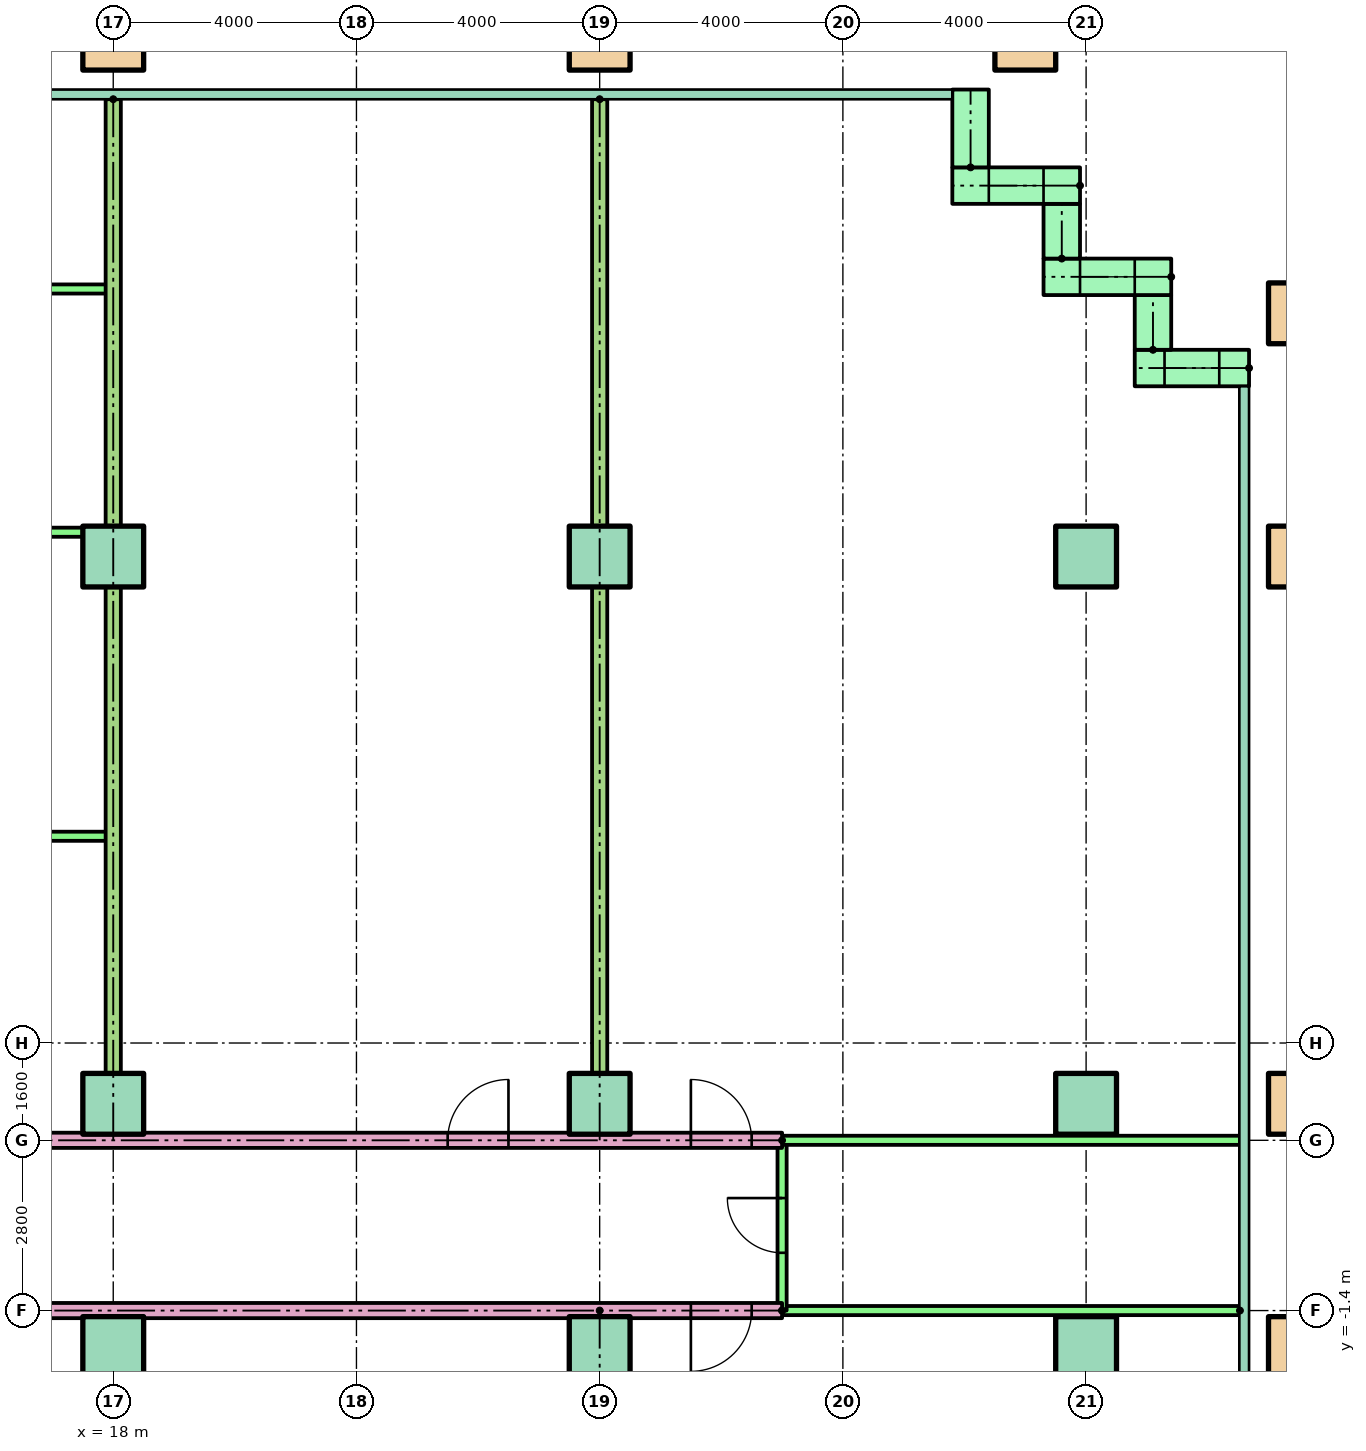
"""IFC4 building model, lengths in metres.
Left out: names, types, materials, properties, quantities, classifications, styles, units other than length and angle.
Written with IfcOpenShell. Run it as: python <this file> out.ifc"""

import sys

from ifc_helpers import new_model, si_unit, direction, frame, frame_2d, origin, origin_2d, place, context, subcontext, project, spatial, rectangle, hollow_rectangle, extrude, element, fill, save


model = new_model("IFC4")
c1 = context("Model", 3, precision=1e-05, world=origin(), true_north=direction((0.0, 1.0)))
c2 = subcontext(c1, "Body", "Model", "MODEL_VIEW")
j1 = project(units=[si_unit("LENGTHUNIT", "METRE"), si_unit("PLANEANGLEUNIT", "RADIAN")], contexts=[c1])
p1 = place(None, origin())
s1 = spatial("IfcSite", under=j1, at=p1, CompositionType="ELEMENT")
p2 = place(p1, origin())
s2 = spatial("IfcBuilding", under=s1, at=p2, CompositionType="ELEMENT")
p3 = place(p2, frame((0.0, 0.0, 37.7)))
s3 = spatial("IfcBuildingStorey", under=s2, at=p3, CompositionType="ELEMENT", Elevation=37.7)
for number, where in (
    (1, (18.0, -2.0, 0.0)),
    (2, (26.0, -2.0, 0.0)),
    (3, (34.0, -2.0, 0.0)),
):
    element("IfcColumn", number, at=place(p3, frame(where)), inside=s3, PredefinedType="COLUMN", context=c2, shape_type="SweptSolid", body=[
        extrude(rectangle(XDim=1.0, YDim=1.0, at=origin_2d()), origin(), (0.0, 0.0, 1.0), 3.9),
    ])
p4 = place(p3, frame((37.5, -2.0, 0.0)))
e4 = element("IfcColumn", 4, at=p4, inside=s3, PredefinedType="COLUMN", context=c2, shape_type="SweptSolid", body=[
    extrude(hollow_rectangle(XDim=1.0, YDim=1.0, WallThickness=0.05, at=origin_2d()), origin(), (0.0, 0.0, 1.0), 3.9),
])
for number, where in (
    (5, (18.0, 2.0, 0.0)),
    (6, (26.0, 2.0, 0.0)),
    (7, (34.0, 2.0, 0.0)),
):
    element("IfcColumn", number, at=place(p3, frame(where)), inside=s3, PredefinedType="COLUMN", context=c2, shape_type="SweptSolid", body=[
        extrude(rectangle(XDim=1.0, YDim=1.0, at=origin_2d()), origin(), (0.0, 0.0, 1.0), 3.9),
    ])
p5 = place(p3, frame((37.5, 2.0, 0.0)))
e8 = element("IfcColumn", 8, at=p5, inside=s3, PredefinedType="COLUMN", context=c2, shape_type="SweptSolid", body=[
    extrude(hollow_rectangle(XDim=1.0, YDim=1.0, WallThickness=0.05, at=origin_2d()), origin(), (0.0, 0.0, 1.0), 3.9),
])
for number, where in (
    (9, (18.0, 11.0, 0.0)),
    (10, (26.0, 11.0, 0.0)),
    (11, (34.0, 11.0, 0.0)),
):
    element("IfcColumn", number, at=place(p3, frame(where)), inside=s3, PredefinedType="COLUMN", context=c2, shape_type="SweptSolid", body=[
        extrude(rectangle(XDim=1.0, YDim=1.0, at=origin_2d()), origin(), (0.0, 0.0, 1.0), 3.9),
    ])
for number, where in (
    (12, (37.5, 11.0, 0.0)),
    (13, (37.5, 15.0, 0.0)),
    (14, (18.0, 19.5, 0.0)),
    (15, (26.0, 19.5, 0.0)),
    (16, (33.0, 19.5, 0.0)),
):
    element("IfcColumn", number, at=place(p3, frame(where)), inside=s3, PredefinedType="COLUMN", context=c2, shape_type="SweptSolid", body=[
        extrude(hollow_rectangle(XDim=1.0, YDim=1.0, WallThickness=0.05, at=origin_2d()), origin(), (0.0, 0.0, 1.0), 3.9),
    ])
p6 = place(p3, frame((36.68, 14.1, 0.0), z_axis=(0.0, 0.0, 1.0), x_axis=(-1.0, 0.0, 0.0)))
e17 = element("IfcWall", 17, at=p6, inside=s3, PredefinedType="STANDARD", context=c2, shape_type="SweptSolid", body=[
    extrude(rectangle(XDim=1.88, YDim=0.6, at=frame_2d((0.94, 0.0))), origin(), (0.0, 0.0, 1.0), 3.62),
])
p7 = place(p6, frame((0.49, 0.0, 0.9)))
e18 = element("IfcOpeningElement", 18, at=p7, cuts=e17, PredefinedType="OPENING", context=c2, shape_type="SweptSolid", body=[
    extrude(rectangle(XDim=0.9, YDim=1.8, at=frame_2d((0.45, 0.9))), frame((0.0, 0.31, 0.0), z_axis=(0.0, -1.0, 0.0), x_axis=(1.0, 0.0, 0.0)), (0.0, 0.0, 1.0), 0.62),
])
p8 = place(p3, frame((35.1, 14.4, 0.0), z_axis=(0.0, 0.0, 1.0), x_axis=(0.0, 1.0, 0.0)))
e19 = element("IfcWall", 19, at=p8, inside=s3, PredefinedType="STANDARD", context=c2, shape_type="SweptSolid", body=[
    extrude(rectangle(XDim=0.9, YDim=0.6, at=frame_2d((0.45, 0.0))), origin(), (0.0, 0.0, 1.0), 3.62),
])
p9 = place(p3, frame((35.4, 15.6, 0.0), z_axis=(0.0, 0.0, 1.0), x_axis=(-1.0, 0.0, 0.0)))
e20 = element("IfcWall", 20, at=p9, inside=s3, PredefinedType="STANDARD", context=c2, shape_type="SweptSolid", body=[
    extrude(rectangle(XDim=2.1, YDim=0.6, at=frame_2d((1.05, 0.0))), origin(), (0.0, 0.0, 1.0), 3.62),
])
p10 = place(p9, frame((0.6, 0.0, 0.9)))
e21 = element("IfcOpeningElement", 21, at=p10, cuts=e20, PredefinedType="OPENING", context=c2, shape_type="SweptSolid", body=[
    extrude(rectangle(XDim=0.9, YDim=1.8, at=frame_2d((0.45, 0.9))), frame((0.0, 0.31, 0.0), z_axis=(0.0, -1.0, 0.0), x_axis=(1.0, 0.0, 0.0)), (0.0, 0.0, 1.0), 0.62),
])
p11 = place(p3, frame((33.6, 15.9, 0.0), z_axis=(0.0, 0.0, 1.0), x_axis=(0.0, 1.0, 0.0)))
e22 = element("IfcWall", 22, at=p11, inside=s3, PredefinedType="STANDARD", context=c2, shape_type="SweptSolid", body=[
    extrude(rectangle(XDim=0.9, YDim=0.6, at=frame_2d((0.45, 0.0))), origin(), (0.0, 0.0, 1.0), 3.62),
])
p12 = place(p3, frame((33.9, 17.1, 0.0), z_axis=(0.0, 0.0, 1.0), x_axis=(-1.0, 0.0, 0.0)))
e23 = element("IfcWall", 23, at=p12, inside=s3, PredefinedType="STANDARD", context=c2, shape_type="SweptSolid", body=[
    extrude(rectangle(XDim=2.1, YDim=0.6, at=frame_2d((1.05, 0.0))), origin(), (0.0, 0.0, 1.0), 3.62),
])
p13 = place(p12, frame((0.6, 0.0, 0.9)))
e24 = element("IfcOpeningElement", 24, at=p13, cuts=e23, PredefinedType="OPENING", context=c2, shape_type="SweptSolid", body=[
    extrude(rectangle(XDim=0.9, YDim=1.8, at=frame_2d((0.45, 0.9))), frame((0.0, 0.31, 0.0), z_axis=(0.0, -1.0, 0.0), x_axis=(1.0, 0.0, 0.0)), (0.0, 0.0, 1.0), 0.62),
])
p14 = place(p3, frame((32.1, 17.4, 0.0), z_axis=(0.0, 0.0, 1.0), x_axis=(0.0, 1.0, 0.0)))
e25 = element("IfcWall", 25, at=p14, inside=s3, PredefinedType="STANDARD", context=c2, shape_type="SweptSolid", body=[
    extrude(rectangle(XDim=1.28, YDim=0.6, at=frame_2d((0.64, 0.0))), origin(), (0.0, 0.0, 1.0), 3.62),
])
p15 = place(p3, frame((29.0, -1.4, 0.0), z_axis=(0.0, 0.0, 1.0), x_axis=(-1.0, 0.0, 0.0)))
e26 = element("IfcWall", 26, at=p15, inside=s3, PredefinedType="PARTITIONING", context=c2, shape_type="SweptSolid", body=[
    extrude(rectangle(XDim=15.0, YDim=0.25, at=frame_2d((7.5, 0.0))), origin(), (0.0, 0.0, 1.0), 3.1),
])
p16 = place(p15, frame((12.5, 0.0, 0.0)))
e27 = element("IfcOpeningElement", 27, at=p16, cuts=e26, PredefinedType="OPENING", context=c2, shape_type="SweptSolid", body=[
    extrude(rectangle(XDim=1.0, YDim=2.1, at=frame_2d((0.5, 1.05))), frame((0.0, 0.135, 0.0), z_axis=(0.0, -1.0, 0.0), x_axis=(1.0, 0.0, 0.0)), (0.0, 0.0, 1.0), 0.27),
])
p17 = place(p15, frame((0.5, 0.0, 0.0)))
e28 = element("IfcOpeningElement", 28, at=p17, cuts=e26, PredefinedType="OPENING", context=c2, shape_type="SweptSolid", body=[
    extrude(rectangle(XDim=1.0, YDim=2.1, at=frame_2d((0.5, 1.05))), frame((0.0, 0.135, 0.0), z_axis=(0.0, -1.0, 0.0), x_axis=(1.0, 0.0, 0.0)), (0.0, 0.0, 1.0), 0.27),
])
p18 = place(p3, frame((36.53, -1.4, 0.0), z_axis=(0.0, 0.0, 1.0), x_axis=(-1.0, 0.0, 0.0)))
e29 = element("IfcWall", 29, at=p18, inside=s3, PredefinedType="PARTITIONING", context=c2, shape_type="SweptSolid", body=[
    extrude(rectangle(XDim=7.53, YDim=0.15, at=frame_2d((3.765, 0.0))), origin(), (0.0, 0.0, 1.0), 3.1),
])
p19 = place(p3, frame((29.0, -1.4, 0.0), z_axis=(0.0, 0.0, 1.0), x_axis=(0.0, 1.0, 0.0)))
e30 = element("IfcWall", 30, at=p19, inside=s3, PredefinedType="PARTITIONING", context=c2, shape_type="SweptSolid", body=[
    extrude(rectangle(XDim=2.8, YDim=0.15, at=frame_2d((1.4, 0.0))), origin(), (0.0, 0.0, 1.0), 3.1),
])
p20 = place(p19, frame((0.95, 0.0, 0.0)))
e31 = element("IfcOpeningElement", 31, at=p20, cuts=e30, PredefinedType="OPENING", context=c2, shape_type="SweptSolid", body=[
    extrude(rectangle(XDim=0.9, YDim=2.1, at=frame_2d((0.45, 1.05))), frame((0.0, 0.085, 0.0), z_axis=(0.0, -1.0, 0.0), x_axis=(1.0, 0.0, 0.0)), (0.0, 0.0, 1.0), 0.17),
])
p21 = place(p3, frame((26.0, -1.4, 0.0), z_axis=(0.0, 0.0, 1.0), x_axis=(0.0, -1.0, 0.0)))
e32 = element("IfcWall", 32, at=p21, inside=s3, PredefinedType="PARTITIONING", context=c2, shape_type="SweptSolid", body=[
    extrude(rectangle(XDim=14.721, YDim=0.25, at=frame_2d((7.361, 0.0))), origin(), (0.0, 0.0, 1.0), 3.1),
])
p22 = place(p3, frame((14.0, 1.4, 0.0)))
e33 = element("IfcWall", 33, at=p22, inside=s3, PredefinedType="PARTITIONING", context=c2, shape_type="SweptSolid", body=[
    extrude(rectangle(XDim=15.0, YDim=0.25, at=frame_2d((7.5, 0.0))), origin(), (0.0, 0.0, 1.0), 3.1),
])
p23 = place(p22, frame((0.3, 0.0, 0.0)))
e34 = element("IfcOpeningElement", 34, at=p23, cuts=e33, PredefinedType="OPENING", context=c2, shape_type="SweptSolid", body=[
    extrude(rectangle(XDim=1.0, YDim=2.1, at=frame_2d((0.5, 1.05))), frame((0.0, 0.135, 0.0), z_axis=(0.0, -1.0, 0.0), x_axis=(1.0, 0.0, 0.0)), (0.0, 0.0, 1.0), 0.27),
])
p24 = place(p22, frame((9.5, 0.0, 0.0)))
e35 = element("IfcOpeningElement", 35, at=p24, cuts=e33, PredefinedType="OPENING", context=c2, shape_type="SweptSolid", body=[
    extrude(rectangle(XDim=1.0, YDim=2.1, at=frame_2d((0.5, 1.05))), frame((0.0, 0.135, 0.0), z_axis=(0.0, -1.0, 0.0), x_axis=(1.0, 0.0, 0.0)), (0.0, 0.0, 1.0), 0.27),
])
p25 = place(p22, frame((13.5, 0.0, 0.0)))
e36 = element("IfcOpeningElement", 36, at=p25, cuts=e33, PredefinedType="OPENING", context=c2, shape_type="SweptSolid", body=[
    extrude(rectangle(XDim=1.0, YDim=2.1, at=frame_2d((0.5, 1.05))), frame((0.0, 0.135, 0.0), z_axis=(0.0, -1.0, 0.0), x_axis=(1.0, 0.0, 0.0)), (0.0, 0.0, 1.0), 0.27),
])
p26 = place(p3, frame((29.0, 1.4, 0.0)))
e37 = element("IfcWall", 37, at=p26, inside=s3, PredefinedType="PARTITIONING", context=c2, shape_type="SweptSolid", body=[
    extrude(rectangle(XDim=7.53, YDim=0.15, at=frame_2d((3.765, 0.0))), origin(), (0.0, 0.0, 1.0), 3.1),
])
for number, where in (
    (38, (15.6, 6.4, 0.0)),
    (39, (15.6, 11.4, 0.0)),
    (40, (15.6, 15.4, 0.0)),
):
    element("IfcWall", number, at=place(p3, frame(where)), inside=s3, PredefinedType="PARTITIONING", context=c2, shape_type="SweptSolid", body=[
        extrude(rectangle(XDim=2.4, YDim=0.15, at=frame_2d((1.2, 0.0))), origin(), (0.0, 0.0, 1.0), 3.1),
    ])
for number, where, z_axis, x_axis in (
    (41, (18.0, 18.521, 0.0), (0.0, 0.0, 1.0), (0.0, -1.0, 0.0)),
    (42, (26.0, 18.521, 0.0), (0.0, 0.0, 1.0), (0.0, -1.0, 0.0)),
):
    element("IfcWall", number, at=place(p3, frame(where, z_axis=z_axis, x_axis=x_axis)), inside=s3, PredefinedType="PARTITIONING", context=c2, shape_type="SweptSolid", body=[
        extrude(rectangle(XDim=17.121, YDim=0.25, at=frame_2d((8.561, 0.0))), origin(), (0.0, 0.0, 1.0), 3.1),
    ])
p27 = place(p7, origin())
e43 = element("IfcWindow", 43, at=p27, inside=s3, PartitioningType="SINGLE_PANEL", PredefinedType="WINDOW", context=c2, shape_type="SweptSolid", body=[
    extrude(rectangle(XDim=0.9, YDim=1.8, at=frame_2d((0.45, 0.9))), frame((0.0, 0.03, 0.0), z_axis=(0.0, -1.0, 0.0), x_axis=(1.0, 0.0, 0.0)), (0.0, 0.0, 1.0), 0.06),
])
fill(e18, e43)
p28 = place(p10, origin())
e44 = element("IfcWindow", 44, at=p28, inside=s3, PartitioningType="SINGLE_PANEL", PredefinedType="WINDOW", context=c2, shape_type="SweptSolid", body=[
    extrude(rectangle(XDim=0.9, YDim=1.8, at=frame_2d((0.45, 0.9))), frame((0.0, 0.03, 0.0), z_axis=(0.0, -1.0, 0.0), x_axis=(1.0, 0.0, 0.0)), (0.0, 0.0, 1.0), 0.06),
])
fill(e21, e44)
p29 = place(p13, origin())
e45 = element("IfcWindow", 45, at=p29, inside=s3, PartitioningType="SINGLE_PANEL", PredefinedType="WINDOW", context=c2, shape_type="SweptSolid", body=[
    extrude(rectangle(XDim=0.9, YDim=1.8, at=frame_2d((0.45, 0.9))), frame((0.0, 0.03, 0.0), z_axis=(0.0, -1.0, 0.0), x_axis=(1.0, 0.0, 0.0)), (0.0, 0.0, 1.0), 0.06),
])
fill(e24, e45)
p30 = place(p17, origin())
e46 = element("IfcDoor", 46, at=p30, inside=s3, OperationType="SINGLE_SWING_RIGHT", PredefinedType="DOOR", context=c2, shape_type="SweptSolid", body=[
    extrude(rectangle(XDim=1.0, YDim=2.1, at=frame_2d((0.5, 1.05))), frame((0.0, 0.025, 0.0), z_axis=(0.0, -1.0, 0.0), x_axis=(1.0, 0.0, 0.0)), (0.0, 0.0, 1.0), 0.05),
])
fill(e28, e46)
p31 = place(p20, origin())
e47 = element("IfcDoor", 47, at=p31, inside=s3, OperationType="SINGLE_SWING_RIGHT", PredefinedType="DOOR", context=c2, shape_type="SweptSolid", body=[
    extrude(rectangle(XDim=0.9, YDim=2.1, at=frame_2d((0.45, 1.05))), frame((0.0, 0.025, 0.0), z_axis=(0.0, -1.0, 0.0), x_axis=(1.0, 0.0, 0.0)), (0.0, 0.0, 1.0), 0.05),
])
fill(e31, e47)
p32 = place(p24, origin())
e48 = element("IfcDoor", 48, at=p32, inside=s3, OperationType="SINGLE_SWING_RIGHT", PredefinedType="DOOR", context=c2, shape_type="SweptSolid", body=[
    extrude(rectangle(XDim=1.0, YDim=2.1, at=frame_2d((0.5, 1.05))), frame((0.0, 0.025, 0.0), z_axis=(0.0, -1.0, 0.0), x_axis=(1.0, 0.0, 0.0)), (0.0, 0.0, 1.0), 0.05),
])
fill(e35, e48)
p33 = place(p25, origin())
e49 = element("IfcDoor", 49, at=p33, inside=s3, OperationType="SINGLE_SWING_LEFT", PredefinedType="DOOR", context=c2, shape_type="SweptSolid", body=[
    extrude(rectangle(XDim=1.0, YDim=2.1, at=frame_2d((0.5, 1.05))), frame((0.0, 0.025, 0.0), z_axis=(0.0, -1.0, 0.0), x_axis=(1.0, 0.0, 0.0)), (0.0, 0.0, 1.0), 0.05),
])
fill(e36, e49)
save(model, sys.argv[1])
